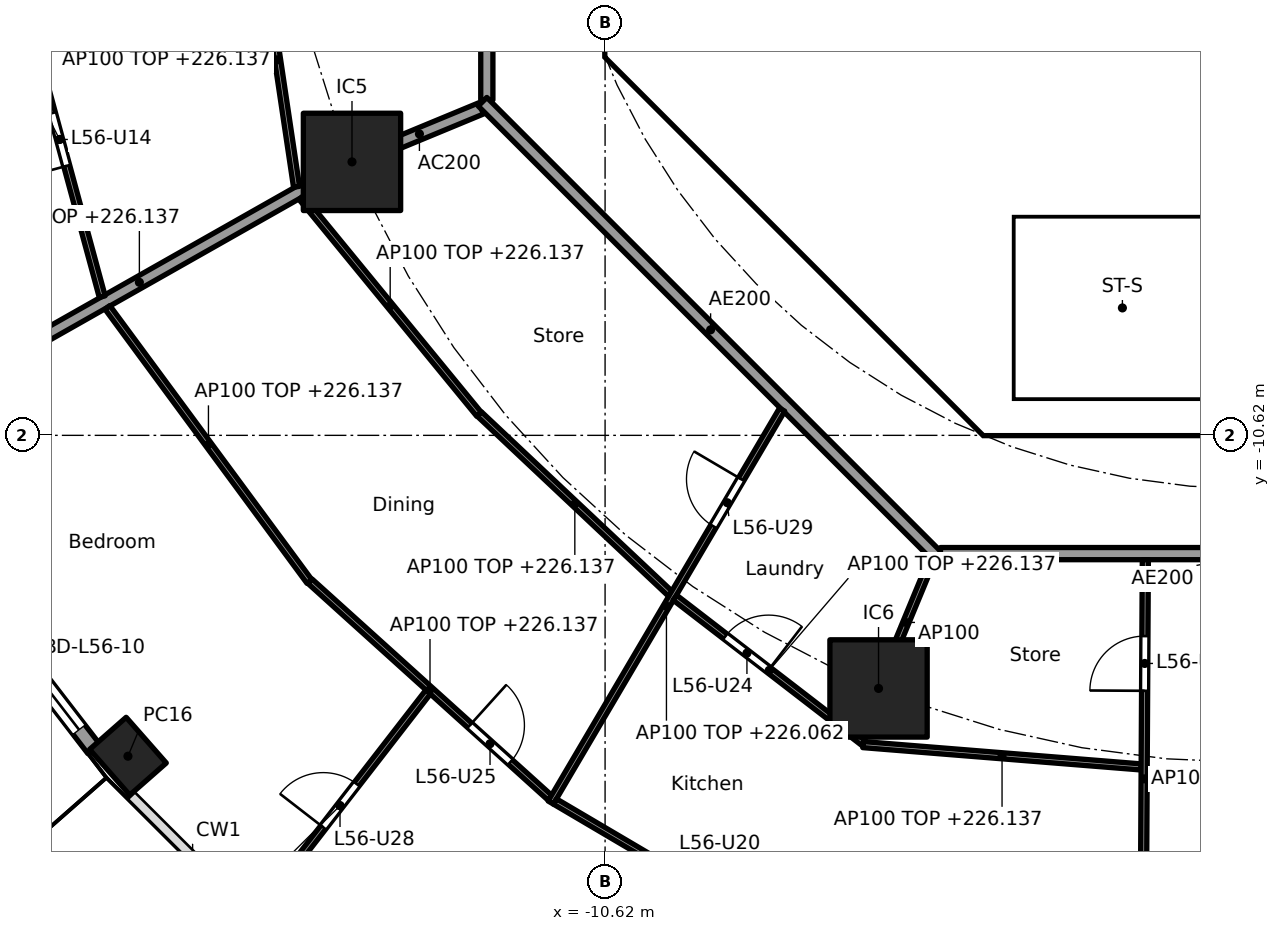
"""IFC4 building model, lengths in metres.
Left out: names, types, materials, properties, quantities, classifications, styles, units other than length and angle.
Written with IfcOpenShell. Run it as: python <this file> out.ifc"""

import sys

from ifc_helpers import new_model, si_unit, direction, frame, frame_2d, origin, origin_2d, place, context, subcontext, project, spatial, polyline, rectangle, hollow_rectangle, outline, extrude, element, fill, save


model = new_model("IFC4")
c1 = context("Model", 3, precision=1e-05, world=origin(), true_north=direction((0.0, 1.0)))
c2 = subcontext(c1, "Body", "Model", "MODEL_VIEW")
j1 = project(units=[si_unit("LENGTHUNIT", "METRE"), si_unit("PLANEANGLEUNIT", "RADIAN")], contexts=[c1])
p1 = place(None, origin())
s1 = spatial("IfcSite", under=j1, at=p1, CompositionType="ELEMENT")
p2 = place(p1, origin())
s2 = spatial("IfcBuilding", under=s1, at=p2, CompositionType="ELEMENT")
p3 = place(p2, frame((0.0, 0.0, 223.3)))
s3 = spatial("IfcBuildingStorey", under=s2, at=p3, CompositionType="ELEMENT", Elevation=223.3)
p4 = place(p3, frame((-18.467, -15.896, 0.0), z_axis=(0.0, 0.0, 1.0), x_axis=(0.660114607735, -0.751164898445, 0.0)))
e1 = element("IfcColumn", 1, at=p4, inside=s3, PredefinedType="COLUMN", context=c2, shape_type="SweptSolid", body=[
    extrude(hollow_rectangle(XDim=1.0, YDim=0.8, WallThickness=0.032, at=origin_2d()), origin(), (0.0, 0.0, 1.0), 3.7),
])
for number, where, z_axis, x_axis in (
    (2, (-14.782, -6.123, 0.0), (0.0, 0.0, 1.0), (1.0, 0.0, 0.0)),
    (3, (-6.123, -14.782, 0.0), (0.0, 0.0, 1.0), (1.0, 0.0, 0.0)),
):
    element("IfcColumn", number, at=place(p3, frame(where, z_axis=z_axis, x_axis=x_axis)), inside=s3, PredefinedType="COLUMN", context=c2, shape_type="SweptSolid", body=[
        extrude(rectangle(XDim=1.6, YDim=1.6, at=origin_2d()), origin(), (0.0, 0.0, 1.0), 3.7),
    ])
p5 = place(p3, frame((-19.026, -15.778, 0.0), z_axis=(0.0, 0.0, 1.0), x_axis=(-0.610438565676, 0.792063607001, 0.0)))
e4 = element("IfcWall", 4, at=p5, inside=s3, PredefinedType="SOLIDWALL", context=c2, shape_type="SweptSolid", body=[
    extrude(rectangle(XDim=2.901, YDim=0.25, at=frame_2d((1.45, 0.0))), origin(), (0.0, 0.0, 1.0), 3.44),
])
p6 = place(p5, frame((0.4, 0.0, 0.0)))
e5 = element("IfcOpeningElement", 5, at=p6, cuts=e4, PredefinedType="OPENING", context=c2, shape_type="SweptSolid", body=[
    extrude(rectangle(XDim=2.1, YDim=2.4, at=frame_2d((1.05, 1.2))), frame((0.0, 0.135, 0.0), z_axis=(0.0, -1.0, 0.0), x_axis=(1.0, 0.0, 0.0)), (0.0, 0.0, 1.0), 0.27),
])
p7 = place(p3, frame((-9.988, -4.613, 0.0), z_axis=(0.0, 0.0, 1.0), x_axis=(0.707106781187, -0.707106781187, 0.0)))
e6 = element("IfcWall", 6, at=p7, inside=s3, PredefinedType="SHEAR", context=c2, shape_type="SweptSolid", body=[
    extrude(rectangle(XDim=7.602, YDim=0.6, at=frame_2d((3.801, 0.0))), origin(), (0.0, 0.0, 1.0), 3.44),
])
p8 = place(p7, frame((6.151, 0.0, 0.0)))
e7 = element("IfcOpeningElement", 7, at=p8, cuts=e6, PredefinedType="OPENING", context=c2, shape_type="SweptSolid", body=[
    extrude(rectangle(XDim=1.1, YDim=2.1, at=frame_2d((0.55, 1.05))), frame((0.0, 0.31, 0.0), z_axis=(0.0, -1.0, 0.0), x_axis=(1.0, 0.0, 0.0)), (0.0, 0.0, 1.0), 0.62),
])
p9 = place(p3, frame((-6.6, -7.427, 0.0), z_axis=(0.0, 0.0, 1.0), x_axis=(0.0, 1.0, 0.0)))
e8 = element("IfcWall", 8, at=p9, inside=s3, PredefinedType="PARTITIONING", context=c2, shape_type="SweptSolid", body=[
    extrude(rectangle(XDim=3.127, YDim=0.15, at=frame_2d((1.563, 0.0))), origin(), (0.0, 0.0, 1.0), 3.44),
])
p10 = place(p9, frame((1.076, 0.0, 0.0)))
e9 = element("IfcOpeningElement", 9, at=p10, cuts=e8, PredefinedType="OPENING", context=c2, shape_type="SweptSolid", body=[
    extrude(rectangle(XDim=0.9, YDim=2.1, at=frame_2d((0.45, 1.05))), frame((0.0, 0.085, 0.0), z_axis=(0.0, -1.0, 0.0), x_axis=(1.0, 0.0, 0.0)), (0.0, 0.0, 1.0), 0.17),
])
p11 = place(p3, frame((-4.0, -6.5, 0.0), z_axis=(0.0, 0.0, 1.0), x_axis=(0.0, 1.0, 0.0)))
e10 = element("IfcWall", 10, at=p11, inside=s3, PredefinedType="SOLIDWALL", context=c2, shape_type="SweptSolid", body=[
    extrude(rectangle(XDim=2.2, YDim=0.2, at=frame_2d((1.1, 0.0))), origin(), (0.0, 0.0, 1.0), 3.44),
])
p12 = place(p11, frame((0.65, 0.0, 0.0)))
e11 = element("IfcOpeningElement", 11, at=p12, cuts=e10, PredefinedType="OPENING", context=c2, shape_type="SweptSolid", body=[
    extrude(rectangle(XDim=0.9, YDim=2.1, at=frame_2d((0.45, 1.05))), frame((0.0, 0.11, 0.0), z_axis=(0.0, -1.0, 0.0), x_axis=(1.0, 0.0, 0.0)), (0.0, 0.0, 1.0), 0.22),
])
p13 = place(p3, origin())
e12 = element("IfcWall", 12, at=p13, inside=s3, PredefinedType="SHEAR", context=c2, shape_type="SweptSolid", body=[
    extrude(outline(polyline([(-10.625, -3.801), (-10.025, -3.801), (-10.025, -4.152), (-9.776, -4.401), (-10.2, -4.825), (-10.625, -4.401), (-10.625, -3.801)])), origin(), (0.0, 0.0, 1.0), 3.44),
])
p14 = place(p3, origin())
e13 = element("IfcWall", 13, at=p14, inside=s3, PredefinedType="SHEAR", context=c2, shape_type="SweptSolid", body=[
    extrude(outline(polyline([(-4.152, -10.025), (4.152, -10.025), (4.401, -9.776), (4.825, -10.2), (4.401, -10.625), (-4.401, -10.625), (-4.825, -10.2), (-4.401, -9.776), (-4.152, -10.025)])), origin(), (0.0, 0.0, 1.0), 3.44),
])
p15 = place(p3, frame((-0.9, -6.5, 0.0), z_axis=(0.0, 0.0, 1.0), x_axis=(0.0, 1.0, 0.0)))
e14 = element("IfcWall", 14, at=p15, inside=s3, PredefinedType="SOLIDWALL", context=c2, shape_type="SweptSolid", body=[
    extrude(rectangle(XDim=2.2, YDim=0.2, at=frame_2d((1.1, 0.0))), origin(), (0.0, 0.0, 1.0), 3.44),
])
p16 = place(p3, origin())
e15 = element("IfcWall", 15, at=p16, inside=s3, PredefinedType="SOLIDWALL", context=c2, shape_type="SweptSolid", body=[
    extrude(outline(polyline([(-3.9, -10.025), (-4.1, -10.025), (-4.1, -7.025), (-3.9, -7.025), (-3.9, -10.025)])), origin(), (0.0, 0.0, 1.0), 3.44),
])
p17 = place(p3, origin())
e16 = element("IfcWall", 16, at=p17, inside=s3, PredefinedType="SOLIDWALL", context=c2, shape_type="SweptSolid", body=[
    extrude(outline(polyline([(4.1, -7.025), (-4.1, -7.025), (-4.1, -6.5), (4.1, -6.5), (4.1, -7.025)])), origin(), (0.0, 0.0, 1.0), 3.44),
])
p18 = place(p3, frame((-12.657, -5.243, 0.0), z_axis=(0.0, 0.0, 1.0), x_axis=(-0.923859888513, -0.38273085373, 0.0)))
e17 = element("IfcWall", 17, at=p18, inside=s3, PredefinedType="PARTITIONING", context=c2, shape_type="SweptSolid", body=[
    extrude(rectangle(XDim=2.199, YDim=0.2, at=frame_2d((1.1, 0.0))), origin(), (0.0, 0.0, 1.0), 3.44),
])
p19 = place(p3, frame((-14.825, -6.148, 0.0), z_axis=(0.0, 0.0, 1.0), x_axis=(-0.870099576105, -0.492875975944, 0.0)))
e18 = element("IfcWall", 18, at=p19, inside=s3, PredefinedType="PARTITIONING", context=c2, shape_type="SweptSolid", body=[
    extrude(rectangle(XDim=7.937, YDim=0.2, at=frame_2d((3.969, 0.0))), origin(), (0.0, 0.0, 1.0), 2.837),
])
p20 = place(p3, frame((-12.565, 5.304, 0.0), z_axis=(0.0, 0.0, 1.0), x_axis=(0.0, -1.0, 0.0)))
e19 = element("IfcWall", 19, at=p20, inside=s3, PredefinedType="PARTITIONING", context=c2, shape_type="SweptSolid", body=[
    extrude(rectangle(XDim=10.409, YDim=0.2, at=frame_2d((5.205, 0.0))), origin(), (0.0, 0.0, 1.0), 3.44),
])
p21 = place(p20, frame((3.07, 0.0, 0.0)))
e20 = element("IfcOpeningElement", 20, at=p21, cuts=e19, PredefinedType="OPENING", context=c2, shape_type="SweptSolid", body=[
    extrude(rectangle(XDim=1.0, YDim=2.1, at=frame_2d((0.5, 1.05))), frame((0.0, 0.11, 0.0), z_axis=(0.0, -1.0, 0.0), x_axis=(1.0, 0.0, 0.0)), (0.0, 0.0, 1.0), 0.22),
])
p22 = place(p3, frame((-12.635, -5.134, 0.0), z_axis=(0.0, 0.0, 1.0), x_axis=(0.707106781187, -0.707106781187, 0.0)))
e21 = element("IfcWall", 21, at=p22, inside=s3, PredefinedType="PARTITIONING", context=c2, shape_type="SweptSolid", body=[
    extrude(rectangle(XDim=10.609, YDim=0.2, at=frame_2d((5.305, 0.0))), origin(), (0.0, 0.0, 1.0), 3.44),
])
p23 = place(p3, frame((-5.104, -12.565, 0.0), z_axis=(0.0, 0.0, 1.0), x_axis=(1.0, 0.0, 0.0)))
e22 = element("IfcWall", 22, at=p23, inside=s3, PredefinedType="PARTITIONING", context=c2, shape_type="SweptSolid", body=[
    extrude(rectangle(XDim=10.409, YDim=0.2, at=frame_2d((5.205, 0.0))), origin(), (0.0, 0.0, 1.0), 3.44),
])
p24 = place(p23, frame((4.604, 0.0, 0.0)))
e23 = element("IfcOpeningElement", 23, at=p24, cuts=e22, PredefinedType="OPENING", context=c2, shape_type="SweptSolid", body=[
    extrude(rectangle(XDim=1.0, YDim=2.1, at=frame_2d((0.5, 1.05))), frame((0.0, 0.11, 0.0), z_axis=(0.0, -1.0, 0.0), x_axis=(1.0, 0.0, 0.0)), (0.0, 0.0, 1.0), 0.22),
])
p25 = place(p3, frame((-16.318, -2.356, 0.0), z_axis=(0.0, 0.0, 1.0), x_axis=(0.147684413341, -0.989034536331, 0.0)))
e24 = element("IfcWall", 24, at=p25, inside=s3, PredefinedType="PARTITIONING", context=c2, shape_type="SweptSolid", body=[
    extrude(rectangle(XDim=4.222, YDim=0.1, at=frame_2d((2.111, 0.0))), origin(), (0.0, 0.0, 1.0), 2.837),
])
p26 = place(p3, frame((-20.292, -3.17, 0.0), z_axis=(0.0, 0.0, 1.0), x_axis=(0.26187906236, -0.965100697698, 0.0)))
e25 = element("IfcWall", 25, at=p26, inside=s3, PredefinedType="PARTITIONING", context=c2, shape_type="SweptSolid", body=[
    extrude(rectangle(XDim=5.356, YDim=0.1, at=frame_2d((2.678, 0.0))), origin(), (0.0, 0.0, 1.0), 2.837),
])
p27 = place(p26, frame((2.228, 0.0, 0.0)))
e26 = element("IfcOpeningElement", 26, at=p27, cuts=e25, PredefinedType="OPENING", context=c2, shape_type="SweptSolid", body=[
    extrude(rectangle(XDim=0.9, YDim=2.1, at=frame_2d((0.45, 1.05))), frame((0.0, 0.06, 0.0), z_axis=(0.0, -1.0, 0.0), x_axis=(1.0, 0.0, 0.0)), (0.0, 0.0, 1.0), 0.12),
])
p28 = place(p3, frame((-15.616, -6.708, 0.0), z_axis=(0.0, 0.0, 1.0), x_axis=(0.634076422357, -0.773270386483, 0.0)))
e27 = element("IfcWall", 27, at=p28, inside=s3, PredefinedType="PARTITIONING", context=c2, shape_type="SweptSolid", body=[
    extrude(rectangle(XDim=4.611, YDim=0.1, at=frame_2d((2.306, 0.0))), origin(), (0.0, 0.0, 1.0), 2.837),
])
p29 = place(p3, frame((-18.804, -8.516, 0.0), z_axis=(0.0, 0.0, 1.0), x_axis=(0.593249583583, -0.805018590828, 0.0)))
e28 = element("IfcWall", 28, at=p29, inside=s3, PredefinedType="PARTITIONING", context=c2, shape_type="SweptSolid", body=[
    extrude(rectangle(XDim=5.602, YDim=0.1, at=frame_2d((2.801, 0.0))), origin(), (0.0, 0.0, 1.0), 2.837),
])
p30 = place(p3, frame((-12.688, -10.27, 0.0), z_axis=(0.0, 0.0, 1.0), x_axis=(0.728268142903, -0.685292282192, 0.0)))
e29 = element("IfcWall", 29, at=p30, inside=s3, PredefinedType="PARTITIONING", context=c2, shape_type="SweptSolid", body=[
    extrude(rectangle(XDim=4.312, YDim=0.1, at=frame_2d((2.156, 0.0))), origin(), (0.0, 0.0, 1.0), 2.837),
])
p31 = place(p3, frame((-15.474, -13.019, 0.0), z_axis=(0.0, 0.0, 1.0), x_axis=(0.742348572616, -0.670013878017, 0.0)))
e30 = element("IfcWall", 30, at=p31, inside=s3, PredefinedType="PARTITIONING", context=c2, shape_type="SweptSolid", body=[
    extrude(rectangle(XDim=5.319, YDim=0.1, at=frame_2d((2.66, 0.0))), origin(), (0.0, 0.0, 1.0), 2.837),
])
p32 = place(p31, frame((3.54, 0.0, 0.0)))
e31 = element("IfcOpeningElement", 31, at=p32, cuts=e30, PredefinedType="OPENING", context=c2, shape_type="SweptSolid", body=[
    extrude(rectangle(XDim=0.9, YDim=2.1, at=frame_2d((0.45, 1.05))), frame((0.0, 0.06, 0.0), z_axis=(0.0, -1.0, 0.0), x_axis=(1.0, 0.0, 0.0)), (0.0, 0.0, 1.0), 0.12),
])
p33 = place(p3, frame((-13.53, -14.84, 0.0), z_axis=(0.0, 0.0, 1.0), x_axis=(-0.612546685222, -0.790434411209, 0.0)))
e32 = element("IfcWall", 32, at=p33, inside=s3, PredefinedType="PARTITIONING", context=c2, shape_type="SweptSolid", body=[
    extrude(rectangle(XDim=4.732, YDim=0.1, at=frame_2d((2.366, 0.0))), origin(), (0.0, 0.0, 1.0), 2.983),
])
p34 = place(p33, frame((1.916, 0.0, 0.0)))
e33 = element("IfcOpeningElement", 33, at=p34, cuts=e32, PredefinedType="OPENING", context=c2, shape_type="SweptSolid", body=[
    extrude(rectangle(XDim=0.9, YDim=2.1, at=frame_2d((0.45, 1.05))), frame((0.0, 0.06, 0.0), z_axis=(0.0, -1.0, 0.0), x_axis=(1.0, 0.0, 0.0)), (0.0, 0.0, 1.0), 0.12),
])
p35 = place(p3, frame((-7.709, -10.198, 0.0), z_axis=(0.0, 0.0, 1.0), x_axis=(-0.507362999545, -0.861732433353, 0.0)))
e34 = element("IfcWall", 34, at=p35, inside=s3, PredefinedType="PARTITIONING", context=c2, shape_type="SweptSolid", body=[
    extrude(rectangle(XDim=7.499, YDim=0.1, at=frame_2d((3.749, 0.0))), origin(), (0.0, 0.0, 1.0), 2.762),
])
p36 = place(p35, frame((1.326, 0.0, 0.0)))
e35 = element("IfcOpeningElement", 35, at=p36, cuts=e34, PredefinedType="OPENING", context=c2, shape_type="SweptSolid", body=[
    extrude(rectangle(XDim=0.9, YDim=2.1, at=frame_2d((0.45, 1.05))), frame((0.0, 0.06, 0.0), z_axis=(0.0, -1.0, 0.0), x_axis=(1.0, 0.0, 0.0)), (0.0, 0.0, 1.0), 0.12),
])
p37 = place(p3, frame((-9.471, -13.289, 0.0), z_axis=(0.0, 0.0, 1.0), x_axis=(0.7922205419, -0.61023488346, 0.0)))
e36 = element("IfcWall", 36, at=p37, inside=s3, PredefinedType="PARTITIONING", context=c2, shape_type="SweptSolid", body=[
    extrude(rectangle(XDim=3.916, YDim=0.1, at=frame_2d((1.958, 0.0))), origin(), (0.0, 0.0, 1.0), 2.837),
])
p38 = place(p37, frame((1.045, 0.0, 0.0)))
e37 = element("IfcOpeningElement", 37, at=p38, cuts=e36, PredefinedType="OPENING", context=c2, shape_type="SweptSolid", body=[
    extrude(rectangle(XDim=0.9, YDim=2.1, at=frame_2d((0.45, 1.05))), frame((0.0, 0.06, 0.0), z_axis=(0.0, -1.0, 0.0), x_axis=(1.0, 0.0, 0.0)), (0.0, 0.0, 1.0), 0.12),
])
p39 = place(p3, frame((-11.445, -16.641, 0.0), z_axis=(0.0, 0.0, 1.0), x_axis=(0.861562560957, -0.507651409489, 0.0)))
e38 = element("IfcWall", 38, at=p39, inside=s3, PredefinedType="PARTITIONING", context=c2, shape_type="SweptSolid", body=[
    extrude(rectangle(XDim=4.985, YDim=0.1, at=frame_2d((2.492, 0.0))), origin(), (0.0, 0.0, 1.0), 2.837),
])
p40 = place(p39, frame((2.042, 0.0, 0.0)))
e39 = element("IfcOpeningElement", 39, at=p40, cuts=e38, PredefinedType="OPENING", context=c2, shape_type="SweptSolid", body=[
    extrude(rectangle(XDim=0.9, YDim=2.1, at=frame_2d((0.45, 1.05))), frame((0.0, 0.06, 0.0), z_axis=(0.0, -1.0, 0.0), x_axis=(1.0, 0.0, 0.0)), (0.0, 0.0, 1.0), 0.12),
])
p41 = place(p3, frame((-5.243, -12.657, 0.0), z_axis=(0.0, 0.0, 1.0), x_axis=(-0.382719158442, -0.923864733477, 0.0)))
e40 = element("IfcWall", 40, at=p41, inside=s3, PredefinedType="PARTITIONING", context=c2, shape_type="SweptSolid", body=[
    extrude(rectangle(XDim=2.25, YDim=0.1, at=frame_2d((1.125, 0.0))), origin(), (0.0, 0.0, 1.0), 3.44),
])
p42 = place(p3, frame((-6.379, -15.705, 0.0), z_axis=(0.0, 0.0, 1.0), x_axis=(0.996786462227, -0.080104611105, 0.0)))
e41 = element("IfcWall", 41, at=p42, inside=s3, PredefinedType="PARTITIONING", context=c2, shape_type="SweptSolid", body=[
    extrude(rectangle(XDim=4.59, YDim=0.1, at=frame_2d((2.295, 0.0))), origin(), (0.0, 0.0, 1.0), 2.837),
])
p43 = place(p3, frame((-1.735, -12.665, 0.0), z_axis=(0.0, 0.0, 1.0), x_axis=(-0.005554152823, -0.999984575574, 0.0)))
e42 = element("IfcWall", 42, at=p43, inside=s3, PredefinedType="PARTITIONING", context=c2, shape_type="SweptSolid", body=[
    extrude(rectangle(XDim=7.209, YDim=0.1, at=frame_2d((3.604, 0.0))), origin(), (0.0, 0.0, 1.0), 2.762),
])
p44 = place(p43, frame((1.256, 0.0, 0.0)))
e43 = element("IfcOpeningElement", 43, at=p44, cuts=e42, PredefinedType="OPENING", context=c2, shape_type="SweptSolid", body=[
    extrude(rectangle(XDim=0.9, YDim=2.1, at=frame_2d((0.45, 1.05))), frame((0.0, 0.06, 0.0), z_axis=(0.0, -1.0, 0.0), x_axis=(1.0, 0.0, 0.0)), (0.0, 0.0, 1.0), 0.12),
])
p45 = place(p43, frame((4.836, 0.0, 0.0)))
e44 = element("IfcOpeningElement", 44, at=p45, cuts=e42, PredefinedType="OPENING", context=c2, shape_type="SweptSolid", body=[
    extrude(rectangle(XDim=0.9, YDim=2.1, at=frame_2d((0.45, 1.05))), frame((0.0, 0.06, 0.0), z_axis=(0.0, -1.0, 0.0), x_axis=(1.0, 0.0, 0.0)), (0.0, 0.0, 1.0), 0.12),
])
p46 = place(p6, origin())
e45 = element("IfcDoor", 45, at=p46, inside=s3, OperationType="SLIDING_TO_LEFT", PredefinedType="DOOR", context=c2, shape_type="SweptSolid", body=[
    extrude(rectangle(XDim=2.1, YDim=2.4, at=frame_2d((1.05, 1.2))), frame((0.0, 0.025, 0.0), z_axis=(0.0, -1.0, 0.0), x_axis=(1.0, 0.0, 0.0)), (0.0, 0.0, 1.0), 0.05),
])
fill(e5, e45)
p47 = place(p10, origin())
e46 = element("IfcDoor", 46, at=p47, inside=s3, OperationType="SINGLE_SWING_RIGHT", PredefinedType="DOOR", context=c2, shape_type="SweptSolid", body=[
    extrude(rectangle(XDim=0.9, YDim=2.1, at=frame_2d((0.45, 1.05))), frame((0.0, 0.025, 0.0), z_axis=(0.0, -1.0, 0.0), x_axis=(1.0, 0.0, 0.0)), (0.0, 0.0, 1.0), 0.05),
])
fill(e9, e46)
p48 = place(p12, frame((0.9, 0.0, 0.0), x_axis=(-1.0, 0.0, 0.0)))
e47 = element("IfcDoor", 47, at=p48, inside=s3, OperationType="SINGLE_SWING_RIGHT", PredefinedType="DOOR", context=c2, shape_type="SweptSolid", body=[
    extrude(rectangle(XDim=0.9, YDim=2.1, at=frame_2d((0.45, 1.05))), frame((0.0, 0.025, 0.0), z_axis=(0.0, -1.0, 0.0), x_axis=(1.0, 0.0, 0.0)), (0.0, 0.0, 1.0), 0.05),
])
fill(e11, e47)
p49 = place(p8, origin())
e48 = element("IfcDoor", 48, at=p49, inside=s3, OperationType="SINGLE_SWING_LEFT", PredefinedType="DOOR", context=c2, shape_type="SweptSolid", body=[
    extrude(rectangle(XDim=1.1, YDim=2.1, at=frame_2d((0.55, 1.05))), frame((0.0, 0.025, 0.0), z_axis=(0.0, -1.0, 0.0), x_axis=(1.0, 0.0, 0.0)), (0.0, 0.0, 1.0), 0.05),
])
fill(e7, e48)
p50 = place(p27, frame((0.9, 0.0, 0.0), x_axis=(-1.0, 0.0, 0.0)))
e49 = element("IfcDoor", 49, at=p50, inside=s3, OperationType="SINGLE_SWING_LEFT", PredefinedType="DOOR", context=c2, shape_type="SweptSolid", body=[
    extrude(rectangle(XDim=0.9, YDim=2.1, at=frame_2d((0.45, 1.05))), frame((0.0, 0.025, 0.0), z_axis=(0.0, -1.0, 0.0), x_axis=(1.0, 0.0, 0.0)), (0.0, 0.0, 1.0), 0.05),
])
fill(e26, e49)
p51 = place(p44, frame((0.9, 0.0, 0.0), x_axis=(-1.0, 0.0, 0.0)))
e50 = element("IfcDoor", 50, at=p51, inside=s3, OperationType="SINGLE_SWING_LEFT", PredefinedType="DOOR", context=c2, shape_type="SweptSolid", body=[
    extrude(rectangle(XDim=0.9, YDim=2.1, at=frame_2d((0.45, 1.05))), frame((0.0, 0.025, 0.0), z_axis=(0.0, -1.0, 0.0), x_axis=(1.0, 0.0, 0.0)), (0.0, 0.0, 1.0), 0.05),
])
fill(e43, e50)
p52 = place(p38, origin())
e51 = element("IfcDoor", 51, at=p52, inside=s3, OperationType="SINGLE_SWING_RIGHT", PredefinedType="DOOR", context=c2, shape_type="SweptSolid", body=[
    extrude(rectangle(XDim=0.9, YDim=2.1, at=frame_2d((0.45, 1.05))), frame((0.0, 0.025, 0.0), z_axis=(0.0, -1.0, 0.0), x_axis=(1.0, 0.0, 0.0)), (0.0, 0.0, 1.0), 0.05),
])
fill(e37, e51)
p53 = place(p32, origin())
e52 = element("IfcDoor", 52, at=p53, inside=s3, OperationType="SINGLE_SWING_LEFT", PredefinedType="DOOR", context=c2, shape_type="SweptSolid", body=[
    extrude(rectangle(XDim=0.9, YDim=2.1, at=frame_2d((0.45, 1.05))), frame((0.0, 0.025, 0.0), z_axis=(0.0, -1.0, 0.0), x_axis=(1.0, 0.0, 0.0)), (0.0, 0.0, 1.0), 0.05),
])
fill(e31, e52)
p54 = place(p34, frame((0.9, 0.0, 0.0), x_axis=(-1.0, 0.0, 0.0)))
e53 = element("IfcDoor", 53, at=p54, inside=s3, OperationType="SINGLE_SWING_LEFT", PredefinedType="DOOR", context=c2, shape_type="SweptSolid", body=[
    extrude(rectangle(XDim=0.9, YDim=2.1, at=frame_2d((0.45, 1.05))), frame((0.0, 0.025, 0.0), z_axis=(0.0, -1.0, 0.0), x_axis=(1.0, 0.0, 0.0)), (0.0, 0.0, 1.0), 0.05),
])
fill(e33, e53)
p55 = place(p36, frame((0.9, 0.0, 0.0), x_axis=(-1.0, 0.0, 0.0)))
e54 = element("IfcDoor", 54, at=p55, inside=s3, OperationType="SINGLE_SWING_RIGHT", PredefinedType="DOOR", context=c2, shape_type="SweptSolid", body=[
    extrude(rectangle(XDim=0.9, YDim=2.1, at=frame_2d((0.45, 1.05))), frame((0.0, 0.025, 0.0), z_axis=(0.0, -1.0, 0.0), x_axis=(1.0, 0.0, 0.0)), (0.0, 0.0, 1.0), 0.05),
])
fill(e35, e54)
save(model, sys.argv[1])
